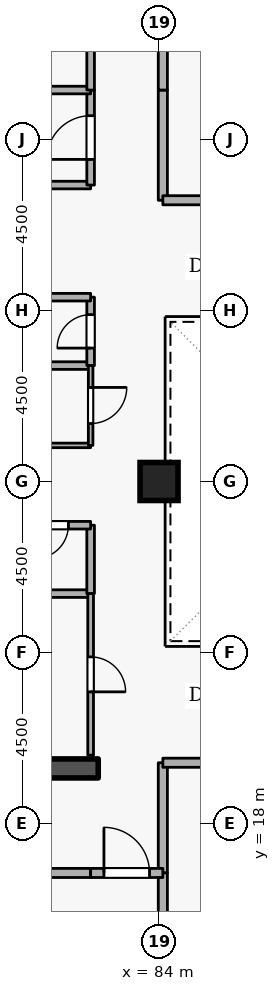
"""IFC4 building model, lengths in metres.
Left out: names, types, materials, properties, quantities, classifications, styles, units other than length and angle.
Written with IfcOpenShell. Run it as: python <this file> out.ifc"""

import sys

from ifc_helpers import new_model, si_unit, direction, frame, frame_2d, origin, origin_2d, place, context, subcontext, project, spatial, rectangle, extrude, element, fill, save


model = new_model("IFC4")
c1 = context("Model", 3, precision=1e-05, world=origin(), true_north=direction((0.0, 1.0)))
c2 = subcontext(c1, "Body", "Model", "MODEL_VIEW")
j1 = project(units=[si_unit("LENGTHUNIT", "METRE"), si_unit("PLANEANGLEUNIT", "RADIAN")], contexts=[c1])
p1 = place(None, origin())
s1 = spatial("IfcSite", under=j1, at=p1, CompositionType="ELEMENT")
p2 = place(p1, origin())
s2 = spatial("IfcBuilding", under=s1, at=p2, CompositionType="ELEMENT")
p3 = place(p2, frame((0.0, 0.0, 221.7)))
s3 = spatial("IfcBuildingStorey", under=s2, at=p3, CompositionType="ELEMENT", Elevation=221.7)
p4 = place(p3, frame((76.6, 19.45, 0.0), z_axis=(0.0, 0.0, 1.0), x_axis=(1.0, 0.0, 0.0)))
e1 = element("IfcWall", 1, at=p4, inside=s3, PredefinedType="SHEAR", context=c2, shape_type="SweptSolid", body=[
    extrude(rectangle(XDim=5.8, YDim=0.5, at=frame_2d((2.9, 0.0))), origin(), (0.0, 0.0, 1.0), 4.2),
])
p5 = place(p3, frame((84.0, 27.0, 0.0), z_axis=(0.0, 0.0, 1.0), x_axis=(1.0, 0.0, 0.0)))
e2 = element("IfcColumn", 2, at=p5, inside=s3, PredefinedType="COLUMN", context=c2, shape_type="SweptSolid", body=[
    extrude(rectangle(XDim=1.0, YDim=1.0, at=origin_2d()), origin(), (0.0, 0.0, 1.0), 4.2),
])
p6 = place(p3, frame((79.9, 34.8, 0.0), z_axis=(0.0, 0.0, 1.0), x_axis=(1.0, 0.0, 0.0)))
e3 = element("IfcWall", 3, at=p6, inside=s3, PredefinedType="STANDARD", context=c2, shape_type="SweptSolid", body=[
    extrude(rectangle(XDim=2.3, YDim=0.2, at=frame_2d((1.15, 0.0))), origin(), (0.0, 0.0, 1.0), 3.145),
])
p7 = place(p3, frame((82.2, 34.8, 0.0), z_axis=(0.0, 0.0, 1.0), x_axis=(0.0, 1.0, 0.0)))
e4 = element("IfcWall", 4, at=p7, inside=s3, PredefinedType="STANDARD", context=c2, shape_type="SweptSolid", body=[
    extrude(rectangle(XDim=2.5, YDim=0.2, at=frame_2d((1.25, 0.0))), origin(), (0.0, 0.0, 1.0), 3.94),
])
p8 = place(p7, frame((0.675, 0.0, 0.0)))
e5 = element("IfcOpeningElement", 5, at=p8, cuts=e4, PredefinedType="OPENING", context=c2, shape_type="SweptSolid", body=[
    extrude(rectangle(XDim=1.15, YDim=2.1, at=frame_2d((0.575, 1.05))), frame((0.0, 0.11, 0.0), z_axis=(0.0, -1.0, 0.0), x_axis=(1.0, 0.0, 0.0)), (0.0, 0.0, 1.0), 0.22),
])
p9 = place(p3, frame((82.2, 37.3, 0.0), z_axis=(0.0, 0.0, 1.0), x_axis=(-1.0, 0.0, 0.0)))
e6 = element("IfcWall", 6, at=p9, inside=s3, PredefinedType="STANDARD", context=c2, shape_type="SweptSolid", body=[
    extrude(rectangle(XDim=5.7, YDim=0.2, at=frame_2d((2.85, 0.0))), origin(), (0.0, 0.0, 1.0), 3.94),
])
p10 = place(p9, frame((2.275, 0.0, 0.0)))
e7 = element("IfcOpeningElement", 7, at=p10, cuts=e6, PredefinedType="OPENING", context=c2, shape_type="SweptSolid", body=[
    extrude(rectangle(XDim=1.15, YDim=2.1, at=frame_2d((0.575, 1.05))), frame((0.0, 0.11, 0.0), z_axis=(0.0, -1.0, 0.0), x_axis=(1.0, 0.0, 0.0)), (0.0, 0.0, 1.0), 0.22),
])
p11 = place(p3, frame((80.15, 24.05, 0.0), z_axis=(0.0, 0.0, 1.0), x_axis=(1.0, 0.0, 0.0)))
e8 = element("IfcWall", 8, at=p11, inside=s3, PredefinedType="STANDARD", context=c2, shape_type="SweptSolid", body=[
    extrude(rectangle(XDim=2.05, YDim=0.2, at=frame_2d((1.025, 0.0))), origin(), (0.0, 0.0, 1.0), 3.94),
])
p12 = place(p3, frame((82.2, 24.05, 0.0), z_axis=(0.0, 0.0, 1.0), x_axis=(0.0, 1.0, 0.0)))
e9 = element("IfcWall", 9, at=p12, inside=s3, PredefinedType="STANDARD", context=c2, shape_type="SweptSolid", body=[
    extrude(rectangle(XDim=1.8, YDim=0.2, at=frame_2d((0.9, 0.0))), origin(), (0.0, 0.0, 1.0), 3.94),
])
p13 = place(p3, frame((82.2, 25.85, 0.0), z_axis=(0.0, 0.0, 1.0), x_axis=(-1.0, 0.0, 0.0)))
e10 = element("IfcWall", 10, at=p13, inside=s3, PredefinedType="STANDARD", context=c2, shape_type="SweptSolid", body=[
    extrude(rectangle(XDim=2.05, YDim=0.2, at=frame_2d((1.025, 0.0))), origin(), (0.0, 0.0, 1.0), 3.94),
])
p14 = place(p13, frame((0.585, 0.0, 0.0)))
e11 = element("IfcOpeningElement", 11, at=p14, cuts=e10, PredefinedType="OPENING", context=c2, shape_type="SweptSolid", body=[
    extrude(rectangle(XDim=0.88, YDim=2.04, at=frame_2d((0.44, 1.02))), frame((0.0, 0.11, 0.0), z_axis=(0.0, -1.0, 0.0), x_axis=(1.0, 0.0, 0.0)), (0.0, 0.0, 1.0), 0.22),
])
p15 = place(p3, frame((80.15, 30.05, 0.0), z_axis=(0.0, 0.0, 1.0), x_axis=(1.0, 0.0, 0.0)))
e12 = element("IfcWall", 12, at=p15, inside=s3, PredefinedType="STANDARD", context=c2, shape_type="SweptSolid", body=[
    extrude(rectangle(XDim=2.05, YDim=0.2, at=frame_2d((1.025, 0.0))), origin(), (0.0, 0.0, 1.0), 3.94),
])
p16 = place(p3, frame((82.2, 30.05, 0.0), z_axis=(0.0, 0.0, 1.0), x_axis=(0.0, 1.0, 0.0)))
e13 = element("IfcWall", 13, at=p16, inside=s3, PredefinedType="STANDARD", context=c2, shape_type="SweptSolid", body=[
    extrude(rectangle(XDim=1.8, YDim=0.2, at=frame_2d((0.9, 0.0))), origin(), (0.0, 0.0, 1.0), 3.94),
])
p17 = place(p16, frame((0.46, 0.0, 0.0)))
e14 = element("IfcOpeningElement", 14, at=p17, cuts=e13, PredefinedType="OPENING", context=c2, shape_type="SweptSolid", body=[
    extrude(rectangle(XDim=0.88, YDim=2.04, at=frame_2d((0.44, 1.02))), frame((0.0, 0.11, 0.0), z_axis=(0.0, -1.0, 0.0), x_axis=(1.0, 0.0, 0.0)), (0.0, 0.0, 1.0), 0.22),
])
p18 = place(p3, frame((82.2, 31.85, 0.0), z_axis=(0.0, 0.0, 1.0), x_axis=(-1.0, 0.0, 0.0)))
e15 = element("IfcWall", 15, at=p18, inside=s3, PredefinedType="STANDARD", context=c2, shape_type="SweptSolid", body=[
    extrude(rectangle(XDim=2.05, YDim=0.2, at=frame_2d((1.025, 0.0))), origin(), (0.0, 0.0, 1.0), 3.94),
])
p19 = place(p3, frame((84.1, 34.4, 0.0), z_axis=(0.0, 0.0, 1.0), x_axis=(0.0, 1.0, 0.0)))
e16 = element("IfcWall", 16, at=p19, inside=s3, PredefinedType="STANDARD", context=c2, shape_type="SweptSolid", body=[
    extrude(rectangle(XDim=2.9, YDim=0.24, at=frame_2d((1.45, 0.0))), origin(), (0.0, 0.0, 1.0), 3.94),
])
p20 = place(p3, frame((84.1, 37.3, 0.0), z_axis=(0.0, 0.0, 1.0), x_axis=(0.0, 1.0, 0.0)))
e17 = element("IfcWall", 17, at=p20, inside=s3, PredefinedType="STANDARD", context=c2, shape_type="SweptSolid", body=[
    extrude(rectangle(XDim=3.75, YDim=0.24, at=frame_2d((1.875, 0.0))), origin(), (0.0, 0.0, 1.0), 3.94),
])
p21 = place(p3, frame((88.5, 34.4, 0.0), z_axis=(0.0, 0.0, 1.0), x_axis=(-1.0, 0.0, 0.0)))
e18 = element("IfcWall", 18, at=p21, inside=s3, PredefinedType="STANDARD", context=c2, shape_type="SweptSolid", body=[
    extrude(rectangle(XDim=4.4, YDim=0.24, at=frame_2d((2.2, 0.0))), origin(), (0.0, 0.0, 1.0), 3.145),
])
p22 = place(p21, frame((1.6, 0.0, 0.0)))
e19 = element("IfcOpeningElement", 19, at=p22, cuts=e18, PredefinedType="OPENING", context=c2, shape_type="SweptSolid", body=[
    extrude(rectangle(XDim=1.2, YDim=2.1, at=frame_2d((0.6, 1.05))), frame((0.0, 0.13, 0.0), z_axis=(0.0, -1.0, 0.0), x_axis=(1.0, 0.0, 0.0)), (0.0, 0.0, 1.0), 0.26),
])
p23 = place(p3, frame((82.2, 41.05, 0.0), z_axis=(0.0, 0.0, 1.0), x_axis=(0.0, -1.0, 0.0)))
e20 = element("IfcWall", 20, at=p23, inside=s3, PredefinedType="STANDARD", context=c2, shape_type="SweptSolid", body=[
    extrude(rectangle(XDim=3.75, YDim=0.2, at=frame_2d((1.875, 0.0))), origin(), (0.0, 0.0, 1.0), 3.94),
])
p24 = place(p3, frame((84.1, 16.7, 0.0), z_axis=(0.0, 0.0, 1.0), x_axis=(0.0, 1.0, 0.0)))
e21 = element("IfcWall", 21, at=p24, inside=s3, PredefinedType="STANDARD", context=c2, shape_type="SweptSolid", body=[
    extrude(rectangle(XDim=2.9, YDim=0.24, at=frame_2d((1.45, 0.0))), origin(), (0.0, 0.0, 1.0), 3.94),
])
p25 = place(p3, frame((84.1, 19.6, 0.0), z_axis=(0.0, 0.0, 1.0), x_axis=(1.0, 0.0, 0.0)))
e22 = element("IfcWall", 22, at=p25, inside=s3, PredefinedType="STANDARD", context=c2, shape_type="SweptSolid", body=[
    extrude(rectangle(XDim=4.4, YDim=0.24, at=frame_2d((2.2, 0.0))), origin(), (0.0, 0.0, 1.0), 3.145),
])
p26 = place(p25, frame((1.6, 0.0, 0.0)))
e23 = element("IfcOpeningElement", 23, at=p26, cuts=e22, PredefinedType="OPENING", context=c2, shape_type="SweptSolid", body=[
    extrude(rectangle(XDim=1.2, YDim=2.1, at=frame_2d((0.6, 1.05))), frame((0.0, 0.13, 0.0), z_axis=(0.0, -1.0, 0.0), x_axis=(1.0, 0.0, 0.0)), (0.0, 0.0, 1.0), 0.26),
])
p27 = place(p3, frame((84.1, 7.0, 0.0), z_axis=(0.0, 0.0, 1.0), x_axis=(0.0, 1.0, 0.0)))
e24 = element("IfcWall", 24, at=p27, inside=s3, PredefinedType="STANDARD", context=c2, shape_type="SweptSolid", body=[
    extrude(rectangle(XDim=9.7, YDim=0.24, at=frame_2d((4.85, 0.0))), origin(), (0.0, 0.0, 1.0), 3.94),
])
p28 = place(p3, frame((76.7, 16.7, 0.0), z_axis=(0.0, 0.0, 1.0), x_axis=(1.0, 0.0, 0.0)))
e25 = element("IfcWall", 25, at=p28, inside=s3, PredefinedType="STANDARD", context=c2, shape_type="SweptSolid", body=[
    extrude(rectangle(XDim=5.5, YDim=0.24, at=frame_2d((2.75, 0.0))), origin(), (0.0, 0.0, 1.0), 3.94),
])
p29 = place(p3, frame((82.2, 16.7, 0.0), z_axis=(0.0, 0.0, 1.0), x_axis=(1.0, 0.0, 0.0)))
e26 = element("IfcWall", 26, at=p29, inside=s3, PredefinedType="STANDARD", context=c2, shape_type="SweptSolid", body=[
    extrude(rectangle(XDim=1.9, YDim=0.24, at=frame_2d((0.95, 0.0))), origin(), (0.0, 0.0, 1.0), 3.94),
])
p30 = place(p29, frame((0.35, 0.0, 0.0)))
e27 = element("IfcOpeningElement", 27, at=p30, cuts=e26, PredefinedType="OPENING", context=c2, shape_type="SweptSolid", body=[
    extrude(rectangle(XDim=1.2, YDim=2.1, at=frame_2d((0.6, 1.05))), frame((0.0, 0.13, 0.0), z_axis=(0.0, -1.0, 0.0), x_axis=(1.0, 0.0, 0.0)), (0.0, 0.0, 1.0), 0.26),
])
p31 = place(p3, frame((82.2, 24.05, 0.0), z_axis=(0.0, 0.0, 1.0), x_axis=(0.0, -1.0, 0.0)))
e28 = element("IfcWall", 28, at=p31, inside=s3, PredefinedType="PARTITIONING", context=c2, shape_type="SweptSolid", body=[
    extrude(rectangle(XDim=4.25, YDim=0.15, at=frame_2d((2.125, 0.0))), origin(), (0.0, 0.0, 1.0), 3.94),
])
p32 = place(p31, frame((1.665, 0.0, 0.0)))
e29 = element("IfcOpeningElement", 29, at=p32, cuts=e28, PredefinedType="OPENING", context=c2, shape_type="SweptSolid", body=[
    extrude(rectangle(XDim=0.92, YDim=2.08, at=frame_2d((0.46, 1.04))), frame((0.0, 0.085, 0.0), z_axis=(0.0, -1.0, 0.0), x_axis=(1.0, 0.0, 0.0)), (0.0, 0.0, 1.0), 0.17),
])
p33 = place(p3, frame((82.2, 27.95, 0.0), z_axis=(0.0, 0.0, 1.0), x_axis=(-1.0, 0.0, 0.0)))
e30 = element("IfcWall", 30, at=p33, inside=s3, PredefinedType="PARTITIONING", context=c2, shape_type="SweptSolid", body=[
    extrude(rectangle(XDim=2.05, YDim=0.12, at=frame_2d((1.025, 0.0))), origin(), (0.0, 0.0, 1.0), 3.94),
])
p34 = place(p3, frame((82.2, 30.05, 0.0), z_axis=(0.0, 0.0, 1.0), x_axis=(0.0, -1.0, 0.0)))
e31 = element("IfcWall", 31, at=p34, inside=s3, PredefinedType="PARTITIONING", context=c2, shape_type="SweptSolid", body=[
    extrude(rectangle(XDim=2.1, YDim=0.12, at=frame_2d((1.05, 0.0))), origin(), (0.0, 0.0, 1.0), 3.94),
])
p35 = place(p34, frame((0.575, 0.0, 0.0)))
e32 = element("IfcOpeningElement", 32, at=p35, cuts=e31, PredefinedType="OPENING", context=c2, shape_type="SweptSolid", body=[
    extrude(rectangle(XDim=0.95, YDim=2.1, at=frame_2d((0.475, 1.05))), frame((0.0, 0.07, 0.0), z_axis=(0.0, -1.0, 0.0), x_axis=(1.0, 0.0, 0.0)), (0.0, 0.0, 1.0), 0.14),
])
p36 = place(p8, origin())
e33 = element("IfcDoor", 33, at=p36, inside=s3, OperationType="SINGLE_SWING_LEFT", PredefinedType="DOOR", context=c2, shape_type="SweptSolid", body=[
    extrude(rectangle(XDim=1.15, YDim=2.1, at=frame_2d((0.575, 1.05))), frame((0.0, 0.025, 0.0), z_axis=(0.0, -1.0, 0.0), x_axis=(1.0, 0.0, 0.0)), (0.0, 0.0, 1.0), 0.05),
])
fill(e5, e33)
p37 = place(p14, origin())
e34 = element("IfcDoor", 34, at=p37, inside=s3, OperationType="SINGLE_SWING_RIGHT", PredefinedType="DOOR", context=c2, shape_type="SweptSolid", body=[
    extrude(rectangle(XDim=0.88, YDim=2.04, at=frame_2d((0.44, 1.02))), frame((0.0, 0.025, 0.0), z_axis=(0.0, -1.0, 0.0), x_axis=(1.0, 0.0, 0.0)), (0.0, 0.0, 1.0), 0.05),
])
fill(e11, e34)
p38 = place(p17, origin())
e35 = element("IfcDoor", 35, at=p38, inside=s3, OperationType="SINGLE_SWING_LEFT", PredefinedType="DOOR", context=c2, shape_type="SweptSolid", body=[
    extrude(rectangle(XDim=0.88, YDim=2.04, at=frame_2d((0.44, 1.02))), frame((0.0, 0.025, 0.0), z_axis=(0.0, -1.0, 0.0), x_axis=(1.0, 0.0, 0.0)), (0.0, 0.0, 1.0), 0.05),
])
fill(e14, e35)
p39 = place(p32, origin())
e36 = element("IfcDoor", 36, at=p39, inside=s3, OperationType="SINGLE_SWING_RIGHT", PredefinedType="DOOR", context=c2, shape_type="SweptSolid", body=[
    extrude(rectangle(XDim=0.92, YDim=2.08, at=frame_2d((0.46, 1.04))), frame((0.0, 0.025, 0.0), z_axis=(0.0, -1.0, 0.0), x_axis=(1.0, 0.0, 0.0)), (0.0, 0.0, 1.0), 0.05),
])
fill(e29, e36)
p40 = place(p35, origin())
e37 = element("IfcDoor", 37, at=p40, inside=s3, OperationType="SINGLE_SWING_LEFT", PredefinedType="DOOR", context=c2, shape_type="SweptSolid", body=[
    extrude(rectangle(XDim=0.95, YDim=2.1, at=frame_2d((0.475, 1.05))), frame((0.0, 0.025, 0.0), z_axis=(0.0, -1.0, 0.0), x_axis=(1.0, 0.0, 0.0)), (0.0, 0.0, 1.0), 0.05),
])
fill(e32, e37)
p41 = place(p30, origin())
e38 = element("IfcDoor", 38, at=p41, inside=s3, OperationType="SINGLE_SWING_LEFT", PredefinedType="DOOR", context=c2, shape_type="SweptSolid", body=[
    extrude(rectangle(XDim=1.2, YDim=2.1, at=frame_2d((0.6, 1.05))), frame((0.0, 0.025, 0.0), z_axis=(0.0, -1.0, 0.0), x_axis=(1.0, 0.0, 0.0)), (0.0, 0.0, 1.0), 0.05),
])
fill(e27, e38)
save(model, sys.argv[1])
